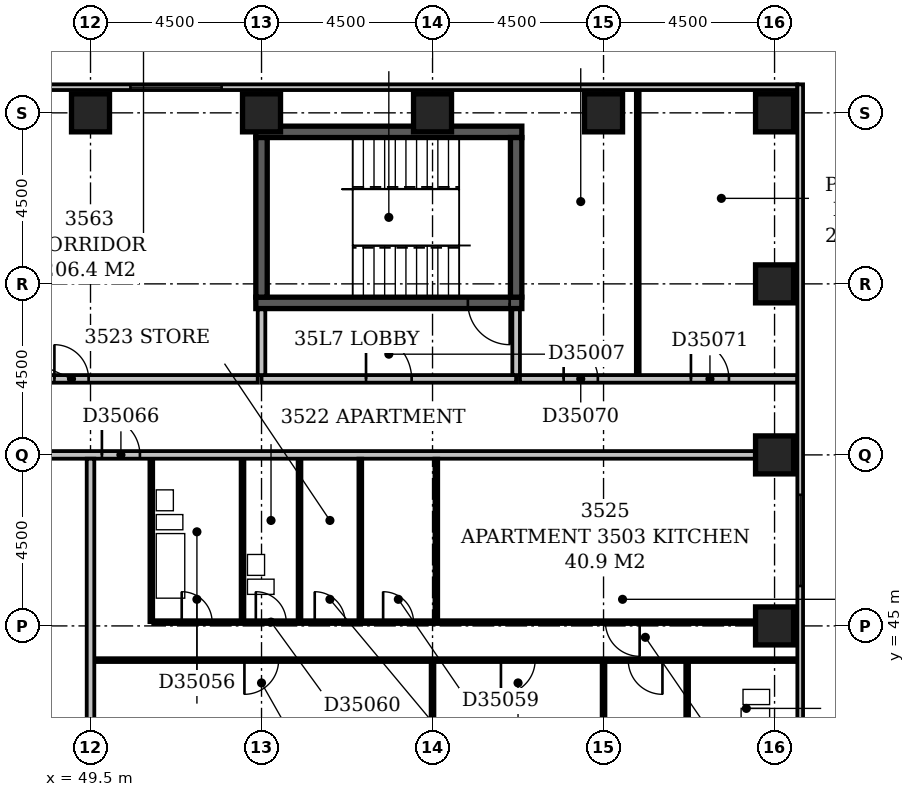
"""IFC4 building model, lengths in metres.
Left out: names, types, materials, properties, quantities, classifications, styles, units other than length and angle.
Written with IfcOpenShell. Run it as: python <this file> out.ifc"""

import sys

from ifc_helpers import new_model, si_unit, direction, frame, frame_2d, origin, origin_2d, place, context, subcontext, project, spatial, rectangle, extrude, element, fill, save


model = new_model("IFC4")
c1 = context("Model", 3, precision=1e-05, world=origin(), true_north=direction((0.0, 1.0)))
c2 = subcontext(c1, "Body", "Model", "MODEL_VIEW")
j1 = project(units=[si_unit("LENGTHUNIT", "METRE"), si_unit("PLANEANGLEUNIT", "RADIAN")], contexts=[c1])
p1 = place(None, origin())
s1 = spatial("IfcSite", under=j1, at=p1, CompositionType="ELEMENT")
p2 = place(p1, origin())
s2 = spatial("IfcBuilding", under=s1, at=p2, CompositionType="ELEMENT")
p3 = place(p2, frame((0.0, 0.0, 141.2)))
s3 = spatial("IfcBuildingStorey", under=s2, at=p3, CompositionType="ELEMENT", Elevation=141.2)
p4 = place(p3, frame((53.85, 53.5, -0.3), z_axis=(0.0, 0.0, 1.0), x_axis=(1.0, 0.0, 0.0)))
e1 = element("IfcWall", 1, at=p4, inside=s3, PredefinedType="SHEAR", context=c2, shape_type="SweptSolid", body=[
    extrude(rectangle(XDim=7.0, YDim=0.3, at=frame_2d((3.5, 0.0))), origin(), (0.0, 0.0, 1.0), 3.6),
])
p5 = place(p4, frame((5.58, 0.0, 0.3)))
e2 = element("IfcOpeningElement", 2, at=p5, cuts=e1, PredefinedType="OPENING", context=c2, shape_type="SweptSolid", body=[
    extrude(rectangle(XDim=1.1, YDim=2.1, at=frame_2d((0.55, 1.05))), frame((0.0, 0.162, 0.0), z_axis=(0.0, -1.0, 0.0), x_axis=(1.0, 0.0, 0.0)), (0.0, 0.0, 1.0), 0.324),
])
p6 = place(p3, frame((53.85, 58.0, -0.3), z_axis=(0.0, 0.0, 1.0), x_axis=(1.0, 0.0, 0.0)))
e3 = element("IfcWall", 3, at=p6, inside=s3, PredefinedType="SHEAR", context=c2, shape_type="SweptSolid", body=[
    extrude(rectangle(XDim=7.0, YDim=0.3, at=frame_2d((3.5, 0.0))), origin(), (0.0, 0.0, 1.0), 3.6),
])
for number, where, z_axis, x_axis in (
    (4, (54.0, 53.65, -0.3), (0.0, 0.0, 1.0), (0.0, 1.0, 0.0)),
    (5, (60.7, 53.65, -0.3), (0.0, 0.0, 1.0), (0.0, 1.0, 0.0)),
):
    element("IfcWall", number, at=place(p3, frame(where, z_axis=z_axis, x_axis=x_axis)), inside=s3, PredefinedType="SHEAR", context=c2, shape_type="SweptSolid", body=[
        extrude(rectangle(XDim=4.2, YDim=0.3, at=frame_2d((2.1, 0.0))), origin(), (0.0, 0.0, 1.0), 3.6),
    ])
for number, where, z_axis, x_axis in (
    (6, (67.5, 45.0, -0.3), (0.0, 0.0, 1.0), (1.0, 0.0, 0.0)),
    (7, (67.5, 49.5, -0.3), (0.0, 0.0, 1.0), (1.0, 0.0, 0.0)),
    (8, (67.5, 54.0, -0.3), (0.0, 0.0, 1.0), (1.0, 0.0, 0.0)),
    (9, (49.5, 58.5, -0.3), (0.0, 0.0, 1.0), (1.0, 0.0, 0.0)),
    (10, (54.0, 58.5, -0.3), (0.0, 0.0, 1.0), (1.0, 0.0, 0.0)),
    (11, (58.5, 58.5, -0.3), (0.0, 0.0, 1.0), (1.0, 0.0, 0.0)),
    (12, (63.0, 58.5, -0.3), (0.0, 0.0, 1.0), (1.0, 0.0, 0.0)),
    (13, (67.5, 58.5, -0.3), (0.0, 0.0, 1.0), (1.0, 0.0, 0.0)),
):
    element("IfcColumn", number, at=place(p3, frame(where, z_axis=z_axis, x_axis=x_axis)), inside=s3, PredefinedType="COLUMN", context=c2, shape_type="SweptSolid", body=[
        extrude(rectangle(XDim=1.0, YDim=1.0, at=origin_2d()), origin(), (0.0, 0.0, 1.0), 3.6),
    ])
p7 = place(p3, frame((68.175, 35.4, 0.0), z_axis=(0.0, 0.0, 1.0), x_axis=(0.0, 1.0, 0.0)))
e14 = element("IfcWall", 14, at=p7, inside=s3, PredefinedType="STANDARD", context=c2, shape_type="SweptSolid", body=[
    extrude(rectangle(XDim=23.85, YDim=0.15, at=frame_2d((11.925, 0.0))), origin(), (0.0, 0.0, 1.0), 2.7),
])
p8 = place(p7, frame((2.847, 0.0, 0.6)))
e15 = element("IfcOpeningElement", 15, at=p8, cuts=e14, PredefinedType="OPENING", context=c2, shape_type="SweptSolid", body=[
    extrude(rectangle(XDim=1.5, YDim=1.8, at=frame_2d((0.75, 0.9))), frame((0.0, 0.087, 0.0), z_axis=(0.0, -1.0, 0.0), x_axis=(1.0, 0.0, 0.0)), (0.0, 0.0, 1.0), 0.174),
])
p9 = place(p7, frame((10.65, 0.0, 0.6)))
e16 = element("IfcOpeningElement", 16, at=p9, cuts=e14, PredefinedType="OPENING", context=c2, shape_type="SweptSolid", body=[
    extrude(rectangle(XDim=2.4, YDim=1.8, at=frame_2d((1.2, 0.9))), frame((0.0, 0.087, 0.0), z_axis=(0.0, -1.0, 0.0), x_axis=(1.0, 0.0, 0.0)), (0.0, 0.0, 1.0), 0.174),
])
p10 = place(p3, frame((68.1, 59.175, 0.0), z_axis=(0.0, 0.0, 1.0), x_axis=(-1.0, 0.0, 0.0)))
e17 = element("IfcWall", 17, at=p10, inside=s3, PredefinedType="STANDARD", context=c2, shape_type="SweptSolid", body=[
    extrude(rectangle(XDim=68.85, YDim=0.15, at=frame_2d((34.425, 0.0))), origin(), (0.0, 0.0, 1.0), 2.7),
])
p11 = place(p10, frame((15.15, 0.0, 0.6)))
e18 = element("IfcOpeningElement", 18, at=p11, cuts=e17, PredefinedType="OPENING", context=c2, shape_type="SweptSolid", body=[
    extrude(rectangle(XDim=2.4, YDim=1.8, at=frame_2d((1.2, 0.9))), frame((0.0, 0.087, 0.0), z_axis=(0.0, -1.0, 0.0), x_axis=(1.0, 0.0, 0.0)), (0.0, 0.0, 1.0), 0.174),
])
p12 = place(p10, frame((19.65, 0.0, 0.6)))
e19 = element("IfcOpeningElement", 19, at=p12, cuts=e17, PredefinedType="OPENING", context=c2, shape_type="SweptSolid", body=[
    extrude(rectangle(XDim=2.4, YDim=1.8, at=frame_2d((1.2, 0.9))), frame((0.0, 0.087, 0.0), z_axis=(0.0, -1.0, 0.0), x_axis=(1.0, 0.0, 0.0)), (0.0, 0.0, 1.0), 0.174),
])
p13 = place(p10, frame((37.65, 0.0, 0.6)))
e20 = element("IfcOpeningElement", 20, at=p13, cuts=e17, PredefinedType="OPENING", context=c2, shape_type="SweptSolid", body=[
    extrude(rectangle(XDim=2.4, YDim=1.8, at=frame_2d((1.2, 0.9))), frame((0.0, 0.087, 0.0), z_axis=(0.0, -1.0, 0.0), x_axis=(1.0, 0.0, 0.0)), (0.0, 0.0, 1.0), 0.174),
])
p14 = place(p3, frame((54.0, 51.5, 0.0), z_axis=(0.0, 0.0, 1.0), x_axis=(1.0, 0.0, 0.0)))
e21 = element("IfcWall", 21, at=p14, inside=s3, PredefinedType="PARTITIONING", context=c2, shape_type="SweptSolid", body=[
    extrude(rectangle(XDim=6.7, YDim=0.2, at=frame_2d((3.35, 0.0))), origin(), (0.0, 0.0, 1.0), 3.3),
])
p15 = place(p14, frame((2.75, 0.0, 0.0)))
e22 = element("IfcOpeningElement", 22, at=p15, cuts=e21, PredefinedType="OPENING", context=c2, shape_type="SweptSolid", body=[
    extrude(rectangle(XDim=1.2, YDim=2.1, at=frame_2d((0.6, 1.05))), frame((0.0, 0.112, 0.0), z_axis=(0.0, -1.0, 0.0), x_axis=(1.0, 0.0, 0.0)), (0.0, 0.0, 1.0), 0.224),
])
p16 = place(p3, frame((60.7, 51.6, 0.0), z_axis=(0.0, 0.0, 1.0), x_axis=(0.0, 1.0, 0.0)))
e23 = element("IfcWall", 23, at=p16, inside=s3, PredefinedType="PARTITIONING", context=c2, shape_type="SweptSolid", body=[
    extrude(rectangle(XDim=1.73, YDim=0.2, at=frame_2d((0.865, 0.0))), origin(), (0.0, 0.0, 1.0), 3.3),
])
p17 = place(p3, frame((54.0, 51.6, 0.0), z_axis=(0.0, 0.0, 1.0), x_axis=(0.0, 1.0, 0.0)))
e24 = element("IfcWall", 24, at=p17, inside=s3, PredefinedType="PARTITIONING", context=c2, shape_type="SweptSolid", body=[
    extrude(rectangle(XDim=1.73, YDim=0.2, at=frame_2d((0.865, 0.0))), origin(), (0.0, 0.0, 1.0), 2.6),
])
p18 = place(p3, frame((49.5, 36.5, 0.0), z_axis=(0.0, 0.0, 1.0), x_axis=(0.0, 1.0, 0.0)))
e25 = element("IfcWall", 25, at=p18, inside=s3, PredefinedType="PARTITIONING", context=c2, shape_type="SweptSolid", body=[
    extrude(rectangle(XDim=12.9, YDim=0.2, at=frame_2d((6.45, 0.0))), origin(), (0.0, 0.0, 1.0), 3.3),
])
p19 = place(p3, frame((58.5, 36.5, 0.0), z_axis=(0.0, 0.0, 1.0), x_axis=(0.0, 1.0, 0.0)))
e26 = element("IfcWall", 26, at=p19, inside=s3, PredefinedType="PARTITIONING", context=c2, shape_type="SweptSolid", body=[
    extrude(rectangle(XDim=7.55, YDim=0.1, at=frame_2d((3.775, 0.0))), origin(), (0.0, 0.0, 1.0), 3.3),
])
p20 = place(p3, frame((63.0, 36.5, 0.0), z_axis=(0.0, 0.0, 1.0), x_axis=(0.0, 1.0, 0.0)))
e27 = element("IfcWall", 27, at=p20, inside=s3, PredefinedType="PARTITIONING", context=c2, shape_type="SweptSolid", body=[
    extrude(rectangle(XDim=7.55, YDim=0.1, at=frame_2d((3.775, 0.0))), origin(), (0.0, 0.0, 1.0), 2.4),
])
p21 = place(p3, frame((65.2, 40.7, 0.0), z_axis=(0.0, 0.0, 1.0), x_axis=(0.0, 1.0, 0.0)))
e28 = element("IfcWall", 28, at=p21, inside=s3, PredefinedType="PLUMBINGWALL", context=c2, shape_type="SweptSolid", body=[
    extrude(rectangle(XDim=3.35, YDim=0.1, at=frame_2d((1.675, 0.0))), origin(), (0.0, 0.0, 1.0), 3.3),
])
p22 = place(p21, frame((1.05, 0.0, 0.0)))
e29 = element("IfcOpeningElement", 29, at=p22, cuts=e28, PredefinedType="OPENING", context=c2, shape_type="SweptSolid", body=[
    extrude(rectangle(XDim=0.8, YDim=2.1, at=frame_2d((0.4, 1.05))), frame((0.0, 0.062, 0.0), z_axis=(0.0, -1.0, 0.0), x_axis=(1.0, 0.0, 0.0)), (0.0, 0.0, 1.0), 0.124),
])
p23 = place(p3, frame((49.6, 44.1, 0.0), z_axis=(0.0, 0.0, 1.0), x_axis=(1.0, 0.0, 0.0)))
e30 = element("IfcWall", 30, at=p23, inside=s3, PredefinedType="PARTITIONING", context=c2, shape_type="SweptSolid", body=[
    extrude(rectangle(XDim=18.5, YDim=0.1, at=frame_2d((9.25, 0.0))), origin(), (0.0, 0.0, 1.0), 3.3),
])
p24 = place(p23, frame((3.95, 0.0, 0.0)))
e31 = element("IfcOpeningElement", 31, at=p24, cuts=e30, PredefinedType="OPENING", context=c2, shape_type="SweptSolid", body=[
    extrude(rectangle(XDim=0.9, YDim=2.1, at=frame_2d((0.45, 1.05))), frame((0.0, 0.062, 0.0), z_axis=(0.0, -1.0, 0.0), x_axis=(1.0, 0.0, 0.0)), (0.0, 0.0, 1.0), 0.124),
])
p25 = place(p23, frame((10.7, 0.0, 0.0)))
e32 = element("IfcOpeningElement", 32, at=p25, cuts=e30, PredefinedType="OPENING", context=c2, shape_type="SweptSolid", body=[
    extrude(rectangle(XDim=0.9, YDim=2.1, at=frame_2d((0.45, 1.05))), frame((0.0, 0.062, 0.0), z_axis=(0.0, -1.0, 0.0), x_axis=(1.0, 0.0, 0.0)), (0.0, 0.0, 1.0), 0.124),
])
p26 = place(p23, frame((14.05, 0.0, 0.0)))
e33 = element("IfcOpeningElement", 33, at=p26, cuts=e30, PredefinedType="OPENING", context=c2, shape_type="SweptSolid", body=[
    extrude(rectangle(XDim=0.9, YDim=2.1, at=frame_2d((0.45, 1.05))), frame((0.0, 0.062, 0.0), z_axis=(0.0, -1.0, 0.0), x_axis=(1.0, 0.0, 0.0)), (0.0, 0.0, 1.0), 0.124),
])
p27 = place(p3, frame((51.1, 45.1, 0.0), z_axis=(0.0, 0.0, 1.0), x_axis=(0.0, 1.0, 0.0)))
e34 = element("IfcWall", 34, at=p27, inside=s3, PredefinedType="PLUMBINGWALL", context=c2, shape_type="SweptSolid", body=[
    extrude(rectangle(XDim=4.3, YDim=0.1, at=frame_2d((2.15, 0.0))), origin(), (0.0, 0.0, 1.0), 3.3),
])
p28 = place(p3, frame((51.15, 45.1, 0.0), z_axis=(0.0, 0.0, 1.0), x_axis=(1.0, 0.0, 0.0)))
e35 = element("IfcWall", 35, at=p28, inside=s3, PredefinedType="PARTITIONING", context=c2, shape_type="SweptSolid", body=[
    extrude(rectangle(XDim=15.85, YDim=0.1, at=frame_2d((7.925, 0.0))), origin(), (0.0, 0.0, 1.0), 3.3),
])
p29 = place(p28, frame((0.75, 0.0, 0.0)))
e36 = element("IfcOpeningElement", 36, at=p29, cuts=e35, PredefinedType="OPENING", context=c2, shape_type="SweptSolid", body=[
    extrude(rectangle(XDim=0.8, YDim=2.1, at=frame_2d((0.4, 1.05))), frame((0.0, 0.062, 0.0), z_axis=(0.0, -1.0, 0.0), x_axis=(1.0, 0.0, 0.0)), (0.0, 0.0, 1.0), 0.124),
])
p30 = place(p28, frame((11.9, 0.0, 0.0)))
e37 = element("IfcOpeningElement", 37, at=p30, cuts=e35, PredefinedType="OPENING", context=c2, shape_type="SweptSolid", body=[
    extrude(rectangle(XDim=0.9, YDim=2.1, at=frame_2d((0.45, 1.05))), frame((0.0, 0.062, 0.0), z_axis=(0.0, -1.0, 0.0), x_axis=(1.0, 0.0, 0.0)), (0.0, 0.0, 1.0), 0.124),
])
p31 = place(p28, frame((4.25, 0.0, 0.0)))
e38 = element("IfcOpeningElement", 38, at=p31, cuts=e35, PredefinedType="OPENING", context=c2, shape_type="SweptSolid", body=[
    extrude(rectangle(XDim=0.8, YDim=2.1, at=frame_2d((0.4, 1.05))), frame((0.0, 0.062, 0.0), z_axis=(0.0, -1.0, 0.0), x_axis=(1.0, 0.0, 0.0)), (0.0, 0.0, 1.0), 0.124),
])
p32 = place(p28, frame((6.05, 0.0, 0.0)))
e39 = element("IfcOpeningElement", 39, at=p32, cuts=e35, PredefinedType="OPENING", context=c2, shape_type="SweptSolid", body=[
    extrude(rectangle(XDim=0.8, YDim=2.1, at=frame_2d((0.4, 1.05))), frame((0.0, 0.062, 0.0), z_axis=(0.0, -1.0, 0.0), x_axis=(1.0, 0.0, 0.0)), (0.0, 0.0, 1.0), 0.124),
])
p33 = place(p28, frame((2.7, 0.0, 0.0)))
e40 = element("IfcOpeningElement", 40, at=p33, cuts=e35, PredefinedType="OPENING", context=c2, shape_type="SweptSolid", body=[
    extrude(rectangle(XDim=0.8, YDim=2.1, at=frame_2d((0.4, 1.05))), frame((0.0, 0.062, 0.0), z_axis=(0.0, -1.0, 0.0), x_axis=(1.0, 0.0, 0.0)), (0.0, 0.0, 1.0), 0.124),
])
p34 = place(p3, frame((53.5, 45.15, 0.0), z_axis=(0.0, 0.0, 1.0), x_axis=(0.0, 1.0, 0.0)))
e41 = element("IfcWall", 41, at=p34, inside=s3, PredefinedType="PLUMBINGWALL", context=c2, shape_type="SweptSolid", body=[
    extrude(rectangle(XDim=4.25, YDim=0.1, at=frame_2d((2.125, 0.0))), origin(), (0.0, 0.0, 1.0), 2.6),
])
p35 = place(p3, frame((55.0, 45.15, 0.0), z_axis=(0.0, 0.0, 1.0), x_axis=(0.0, 1.0, 0.0)))
e42 = element("IfcWall", 42, at=p35, inside=s3, PredefinedType="PLUMBINGWALL", context=c2, shape_type="SweptSolid", body=[
    extrude(rectangle(XDim=4.25, YDim=0.1, at=frame_2d((2.125, 0.0))), origin(), (0.0, 0.0, 1.0), 3.3),
])
for number, where, z_axis, x_axis in (
    (43, (56.6, 45.15, 0.0), (0.0, 0.0, 1.0), (0.0, 1.0, 0.0)),
    (44, (58.6, 45.15, 0.0), (0.0, 0.0, 1.0), (0.0, 1.0, 0.0)),
):
    element("IfcWall", number, at=place(p3, frame(where, z_axis=z_axis, x_axis=x_axis)), inside=s3, PredefinedType="PARTITIONING", context=c2, shape_type="SweptSolid", body=[
        extrude(rectangle(XDim=4.25, YDim=0.1, at=frame_2d((2.125, 0.0))), origin(), (0.0, 0.0, 1.0), 3.3),
    ])
p36 = place(p3, frame((48.35, 49.5, 0.0), z_axis=(0.0, 0.0, 1.0), x_axis=(1.0, 0.0, 0.0)))
e45 = element("IfcWall", 45, at=p36, inside=s3, PredefinedType="PARTITIONING", context=c2, shape_type="SweptSolid", body=[
    extrude(rectangle(XDim=18.65, YDim=0.2, at=frame_2d((9.325, 0.0))), origin(), (0.0, 0.0, 1.0), 3.3),
])
p37 = place(p36, frame((1.45, 0.0, 0.0)))
e46 = element("IfcOpeningElement", 46, at=p37, cuts=e45, PredefinedType="OPENING", context=c2, shape_type="SweptSolid", body=[
    extrude(rectangle(XDim=1.0, YDim=2.1, at=frame_2d((0.5, 1.05))), frame((0.0, 0.112, 0.0), z_axis=(0.0, -1.0, 0.0), x_axis=(1.0, 0.0, 0.0)), (0.0, 0.0, 1.0), 0.224),
])
p38 = place(p3, frame((44.1, 51.5, 0.0), z_axis=(0.0, 0.0, 1.0), x_axis=(1.0, 0.0, 0.0)))
e47 = element("IfcWall", 47, at=p38, inside=s3, PredefinedType="PARTITIONING", context=c2, shape_type="SweptSolid", body=[
    extrude(rectangle(XDim=9.8, YDim=0.2, at=frame_2d((4.9, 0.0))), origin(), (0.0, 0.0, 1.0), 3.3),
])
p39 = place(p38, frame((4.45, 0.0, 0.0)))
e48 = element("IfcOpeningElement", 48, at=p39, cuts=e47, PredefinedType="OPENING", context=c2, shape_type="SweptSolid", body=[
    extrude(rectangle(XDim=0.9, YDim=2.1, at=frame_2d((0.45, 1.05))), frame((0.0, 0.112, 0.0), z_axis=(0.0, -1.0, 0.0), x_axis=(1.0, 0.0, 0.0)), (0.0, 0.0, 1.0), 0.224),
])
p40 = place(p3, frame((60.8, 51.5, 0.0), z_axis=(0.0, 0.0, 1.0), x_axis=(1.0, 0.0, 0.0)))
e49 = element("IfcWall", 49, at=p40, inside=s3, PredefinedType="PARTITIONING", context=c2, shape_type="SweptSolid", body=[
    extrude(rectangle(XDim=7.3, YDim=0.2, at=frame_2d((3.65, 0.0))), origin(), (0.0, 0.0, 1.0), 3.3),
])
p41 = place(p40, frame((1.15, 0.0, 0.0)))
e50 = element("IfcOpeningElement", 50, at=p41, cuts=e49, PredefinedType="OPENING", context=c2, shape_type="SweptSolid", body=[
    extrude(rectangle(XDim=0.9, YDim=2.1, at=frame_2d((0.45, 1.05))), frame((0.0, 0.112, 0.0), z_axis=(0.0, -1.0, 0.0), x_axis=(1.0, 0.0, 0.0)), (0.0, 0.0, 1.0), 0.224),
])
p42 = place(p40, frame((4.5, 0.0, 0.0)))
e51 = element("IfcOpeningElement", 51, at=p42, cuts=e49, PredefinedType="OPENING", context=c2, shape_type="SweptSolid", body=[
    extrude(rectangle(XDim=1.0, YDim=2.1, at=frame_2d((0.5, 1.05))), frame((0.0, 0.112, 0.0), z_axis=(0.0, -1.0, 0.0), x_axis=(1.0, 0.0, 0.0)), (0.0, 0.0, 1.0), 0.224),
])
p43 = place(p3, frame((63.9, 51.6, 0.0), z_axis=(0.0, 0.0, 1.0), x_axis=(0.0, 1.0, 0.0)))
e52 = element("IfcWall", 52, at=p43, inside=s3, PredefinedType="PARTITIONING", context=c2, shape_type="SweptSolid", body=[
    extrude(rectangle(XDim=7.5, YDim=0.1, at=frame_2d((3.75, 0.0))), origin(), (0.0, 0.0, 1.0), 3.3),
])
p44 = place(p9, origin())
e53 = element("IfcWindow", 53, at=p44, inside=s3, PartitioningType="SINGLE_PANEL", PredefinedType="WINDOW", context=c2, shape_type="SweptSolid", body=[
    extrude(rectangle(XDim=2.4, YDim=1.8, at=frame_2d((1.2, 0.9))), frame((0.0, 0.03, 0.0), z_axis=(0.0, -1.0, 0.0), x_axis=(1.0, 0.0, 0.0)), (0.0, 0.0, 1.0), 0.06),
])
fill(e16, e53)
p45 = place(p11, origin())
e54 = element("IfcWindow", 54, at=p45, inside=s3, PartitioningType="SINGLE_PANEL", PredefinedType="WINDOW", context=c2, shape_type="SweptSolid", body=[
    extrude(rectangle(XDim=2.4, YDim=1.8, at=frame_2d((1.2, 0.9))), frame((0.0, 0.03, 0.0), z_axis=(0.0, -1.0, 0.0), x_axis=(1.0, 0.0, 0.0)), (0.0, 0.0, 1.0), 0.06),
])
fill(e18, e54)
p46 = place(p15, origin())
e55 = element("IfcDoor", 55, at=p46, inside=s3, OperationType="SINGLE_SWING_LEFT", PredefinedType="DOOR", context=c2, shape_type="SweptSolid", body=[
    extrude(rectangle(XDim=1.2, YDim=2.1, at=frame_2d((0.6, 1.05))), frame((0.0, 0.025, 0.0), z_axis=(0.0, -1.0, 0.0), x_axis=(1.0, 0.0, 0.0)), (0.0, 0.0, 1.0), 0.05),
])
fill(e22, e55)
p47 = place(p5, origin())
e56 = element("IfcDoor", 56, at=p47, inside=s3, OperationType="SINGLE_SWING_RIGHT", PredefinedType="DOOR", context=c2, shape_type="SweptSolid", body=[
    extrude(rectangle(XDim=1.1, YDim=2.1, at=frame_2d((0.55, 1.05))), frame((0.0, 0.025, 0.0), z_axis=(0.0, -1.0, 0.0), x_axis=(1.0, 0.0, 0.0)), (0.0, 0.0, 1.0), 0.05),
])
fill(e2, e56)
p48 = place(p24, frame((0.9, 0.0, 0.0), z_axis=(0.0, 0.0, 1.0), x_axis=(-1.0, 0.0, 0.0)))
e57 = element("IfcDoor", 57, at=p48, inside=s3, OperationType="SINGLE_SWING_RIGHT", PredefinedType="DOOR", context=c2, shape_type="SweptSolid", body=[
    extrude(rectangle(XDim=0.9, YDim=2.1, at=frame_2d((0.45, 1.05))), frame((0.0, 0.025, 0.0), z_axis=(0.0, -1.0, 0.0), x_axis=(1.0, 0.0, 0.0)), (0.0, 0.0, 1.0), 0.05),
])
fill(e31, e57)
p49 = place(p25, frame((0.9, 0.0, 0.0), z_axis=(0.0, 0.0, 1.0), x_axis=(-1.0, 0.0, 0.0)))
e58 = element("IfcDoor", 58, at=p49, inside=s3, OperationType="SINGLE_SWING_RIGHT", PredefinedType="DOOR", context=c2, shape_type="SweptSolid", body=[
    extrude(rectangle(XDim=0.9, YDim=2.1, at=frame_2d((0.45, 1.05))), frame((0.0, 0.025, 0.0), z_axis=(0.0, -1.0, 0.0), x_axis=(1.0, 0.0, 0.0)), (0.0, 0.0, 1.0), 0.05),
])
fill(e32, e58)
p50 = place(p26, origin())
e59 = element("IfcDoor", 59, at=p50, inside=s3, OperationType="SINGLE_SWING_RIGHT", PredefinedType="DOOR", context=c2, shape_type="SweptSolid", body=[
    extrude(rectangle(XDim=0.9, YDim=2.1, at=frame_2d((0.45, 1.05))), frame((0.0, 0.025, 0.0), z_axis=(0.0, -1.0, 0.0), x_axis=(1.0, 0.0, 0.0)), (0.0, 0.0, 1.0), 0.05),
])
fill(e33, e59)
p51 = place(p29, origin())
e60 = element("IfcDoor", 60, at=p51, inside=s3, OperationType="SINGLE_SWING_LEFT", PredefinedType="DOOR", context=c2, shape_type="SweptSolid", body=[
    extrude(rectangle(XDim=0.8, YDim=2.1, at=frame_2d((0.4, 1.05))), frame((0.0, 0.025, 0.0), z_axis=(0.0, -1.0, 0.0), x_axis=(1.0, 0.0, 0.0)), (0.0, 0.0, 1.0), 0.05),
])
fill(e36, e60)
p52 = place(p30, origin())
e61 = element("IfcDoor", 61, at=p52, inside=s3, OperationType="SINGLE_SWING_RIGHT", PredefinedType="DOOR", context=c2, shape_type="SweptSolid", body=[
    extrude(rectangle(XDim=0.9, YDim=2.1, at=frame_2d((0.45, 1.05))), frame((0.0, 0.025, 0.0), z_axis=(0.0, -1.0, 0.0), x_axis=(1.0, 0.0, 0.0)), (0.0, 0.0, 1.0), 0.05),
])
fill(e37, e61)
p53 = place(p31, origin())
e62 = element("IfcDoor", 62, at=p53, inside=s3, OperationType="SINGLE_SWING_LEFT", PredefinedType="DOOR", context=c2, shape_type="SweptSolid", body=[
    extrude(rectangle(XDim=0.8, YDim=2.1, at=frame_2d((0.4, 1.05))), frame((0.0, 0.025, 0.0), z_axis=(0.0, -1.0, 0.0), x_axis=(1.0, 0.0, 0.0)), (0.0, 0.0, 1.0), 0.05),
])
fill(e38, e62)
p54 = place(p32, origin())
e63 = element("IfcDoor", 63, at=p54, inside=s3, OperationType="SINGLE_SWING_LEFT", PredefinedType="DOOR", context=c2, shape_type="SweptSolid", body=[
    extrude(rectangle(XDim=0.8, YDim=2.1, at=frame_2d((0.4, 1.05))), frame((0.0, 0.025, 0.0), z_axis=(0.0, -1.0, 0.0), x_axis=(1.0, 0.0, 0.0)), (0.0, 0.0, 1.0), 0.05),
])
fill(e39, e63)
p55 = place(p33, origin())
e64 = element("IfcDoor", 64, at=p55, inside=s3, OperationType="SINGLE_SWING_LEFT", PredefinedType="DOOR", context=c2, shape_type="SweptSolid", body=[
    extrude(rectangle(XDim=0.8, YDim=2.1, at=frame_2d((0.4, 1.05))), frame((0.0, 0.025, 0.0), z_axis=(0.0, -1.0, 0.0), x_axis=(1.0, 0.0, 0.0)), (0.0, 0.0, 1.0), 0.05),
])
fill(e40, e64)
p56 = place(p37, origin())
e65 = element("IfcDoor", 65, at=p56, inside=s3, OperationType="SINGLE_SWING_LEFT", PredefinedType="DOOR", context=c2, shape_type="SweptSolid", body=[
    extrude(rectangle(XDim=1.0, YDim=2.1, at=frame_2d((0.5, 1.05))), frame((0.0, 0.025, 0.0), z_axis=(0.0, -1.0, 0.0), x_axis=(1.0, 0.0, 0.0)), (0.0, 0.0, 1.0), 0.05),
])
fill(e46, e65)
p57 = place(p39, origin())
e66 = element("IfcDoor", 66, at=p57, inside=s3, OperationType="SINGLE_SWING_LEFT", PredefinedType="DOOR", context=c2, shape_type="SweptSolid", body=[
    extrude(rectangle(XDim=0.9, YDim=2.1, at=frame_2d((0.45, 1.05))), frame((0.0, 0.025, 0.0), z_axis=(0.0, -1.0, 0.0), x_axis=(1.0, 0.0, 0.0)), (0.0, 0.0, 1.0), 0.05),
])
fill(e48, e66)
p58 = place(p41, origin())
e67 = element("IfcDoor", 67, at=p58, inside=s3, OperationType="SINGLE_SWING_LEFT", PredefinedType="DOOR", context=c2, shape_type="SweptSolid", body=[
    extrude(rectangle(XDim=0.9, YDim=2.1, at=frame_2d((0.45, 1.05))), frame((0.0, 0.025, 0.0), z_axis=(0.0, -1.0, 0.0), x_axis=(1.0, 0.0, 0.0)), (0.0, 0.0, 1.0), 0.05),
])
fill(e50, e67)
p59 = place(p42, origin())
e68 = element("IfcDoor", 68, at=p59, inside=s3, OperationType="SINGLE_SWING_LEFT", PredefinedType="DOOR", context=c2, shape_type="SweptSolid", body=[
    extrude(rectangle(XDim=1.0, YDim=2.1, at=frame_2d((0.5, 1.05))), frame((0.0, 0.025, 0.0), z_axis=(0.0, -1.0, 0.0), x_axis=(1.0, 0.0, 0.0)), (0.0, 0.0, 1.0), 0.05),
])
fill(e51, e68)
save(model, sys.argv[1])
